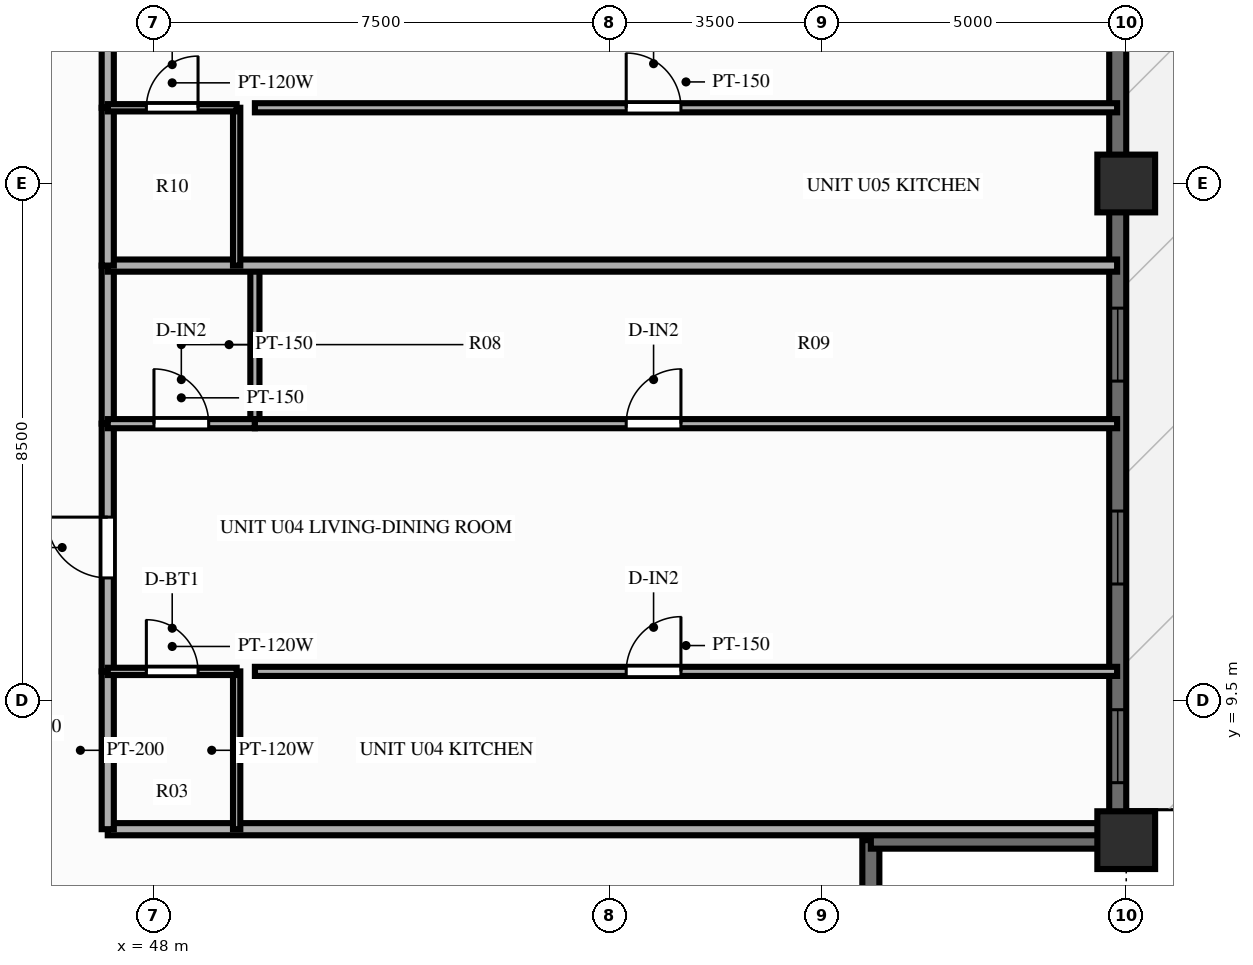
"""IFC4 building model, lengths in metres.
Left out: names, types, materials, properties, quantities, classifications, styles, units other than length and angle.
Written with IfcOpenShell. Run it as: python <this file> out.ifc"""

import sys

from ifc_helpers import new_model, si_unit, direction, frame, frame_2d, origin, origin_2d, place, context, subcontext, project, spatial, rectangle, extrude, source, transform, mapped, element, fill, save


model = new_model("IFC4")
c1 = context("Model", 3, precision=1e-05, world=origin(), true_north=direction((0.0, 1.0)))
c2 = subcontext(c1, "Body", "Model", "MODEL_VIEW")
j1 = project(units=[si_unit("LENGTHUNIT", "METRE"), si_unit("PLANEANGLEUNIT", "RADIAN")], contexts=[c1])
p1 = place(None, origin())
s1 = spatial("IfcSite", under=j1, at=p1, CompositionType="ELEMENT")
p2 = place(p1, origin())
s2 = spatial("IfcBuilding", under=s1, at=p2, CompositionType="ELEMENT")
p3 = place(p2, frame((0.0, 0.0, 95.85)))
s3 = spatial("IfcBuildingStorey", under=s2, at=p3, CompositionType="ELEMENT", Elevation=95.85)
m1 = source(origin(), c2, "Body", "SweptSolid", [
    extrude(rectangle(XDim=0.95, YDim=0.95, at=origin_2d()), origin(), (0.0, 0.0, 1.0), 3.0),
])
for number, where, z_axis, x_axis in (
    (1, (64.0, 7.2, 0.0), (0.0, 0.0, 1.0), (1.0, 0.0, 0.0)),
    (2, (64.0, 18.0, 0.0), (0.0, 0.0, 1.0), (1.0, 0.0, 0.0)),
):
    element("IfcColumn", number, at=place(p3, frame(where, z_axis=z_axis, x_axis=x_axis)), inside=s3, PredefinedType="COLUMN", context=c2, shape_type="MappedRepresentation", body=[
        mapped(m1, transform((0.0, 0.0, 0.0), scale=1.0)),
    ])
p4 = place(p3, frame((63.86, 7.2, 0.0), z_axis=(0.0, 0.0, 1.0), x_axis=(0.0, 1.0, 0.0)))
e3 = element("IfcWall", 3, at=p4, inside=s3, PredefinedType="SOLIDWALL", context=c2, shape_type="SweptSolid", body=[
    extrude(rectangle(XDim=39.6, YDim=0.28, at=frame_2d((19.8, 0.0))), origin(), (0.0, 0.0, 1.0), 2.28),
])
p5 = place(p4, frame((0.945, 0.0, 0.25)))
e4 = element("IfcOpeningElement", 4, at=p5, cuts=e3, PredefinedType="OPENING", context=c2, shape_type="SweptSolid", body=[
    extrude(rectangle(XDim=1.2, YDim=1.5, at=frame_2d((0.6, 0.75))), frame((0.0, 0.152, 0.0), z_axis=(0.0, -1.0, 0.0), x_axis=(1.0, 0.0, 0.0)), (0.0, 0.0, 1.0), 0.304),
])
p6 = place(p4, frame((4.213, 0.0, 0.25)))
e5 = element("IfcOpeningElement", 5, at=p6, cuts=e3, PredefinedType="OPENING", context=c2, shape_type="SweptSolid", body=[
    extrude(rectangle(XDim=1.2, YDim=1.5, at=frame_2d((0.6, 0.75))), frame((0.0, 0.152, 0.0), z_axis=(0.0, -1.0, 0.0), x_axis=(1.0, 0.0, 0.0)), (0.0, 0.0, 1.0), 0.304),
])
p7 = place(p4, frame((7.55, 0.0, 0.25)))
e6 = element("IfcOpeningElement", 6, at=p7, cuts=e3, PredefinedType="OPENING", context=c2, shape_type="SweptSolid", body=[
    extrude(rectangle(XDim=1.2, YDim=1.5, at=frame_2d((0.6, 0.75))), frame((0.0, 0.152, 0.0), z_axis=(0.0, -1.0, 0.0), x_axis=(1.0, 0.0, 0.0)), (0.0, 0.0, 1.0), 0.304),
])
p8 = place(p4, frame((13.483, 0.0, 0.25)))
e7 = element("IfcOpeningElement", 7, at=p8, cuts=e3, PredefinedType="OPENING", context=c2, shape_type="SweptSolid", body=[
    extrude(rectangle(XDim=1.2, YDim=1.5, at=frame_2d((0.6, 0.75))), frame((0.0, 0.152, 0.0), z_axis=(0.0, -1.0, 0.0), x_axis=(1.0, 0.0, 0.0)), (0.0, 0.0, 1.0), 0.304),
])
p9 = place(p4, frame((16.82, 0.0, 0.25)))
e8 = element("IfcOpeningElement", 8, at=p9, cuts=e3, PredefinedType="OPENING", context=c2, shape_type="SweptSolid", body=[
    extrude(rectangle(XDim=1.2, YDim=1.5, at=frame_2d((0.6, 0.75))), frame((0.0, 0.152, 0.0), z_axis=(0.0, -1.0, 0.0), x_axis=(1.0, 0.0, 0.0)), (0.0, 0.0, 1.0), 0.304),
])
p10 = place(p4, frame((19.2, 0.0, 0.25)))
e9 = element("IfcOpeningElement", 9, at=p10, cuts=e3, PredefinedType="OPENING", context=c2, shape_type="SweptSolid", body=[
    extrude(rectangle(XDim=1.2, YDim=1.5, at=frame_2d((0.6, 0.75))), frame((0.0, 0.152, 0.0), z_axis=(0.0, -1.0, 0.0), x_axis=(1.0, 0.0, 0.0)), (0.0, 0.0, 1.0), 0.304),
])
p11 = place(p4, frame((21.578, 0.0, 0.25)))
e10 = element("IfcOpeningElement", 10, at=p11, cuts=e3, PredefinedType="OPENING", context=c2, shape_type="SweptSolid", body=[
    extrude(rectangle(XDim=1.2, YDim=1.5, at=frame_2d((0.6, 0.75))), frame((0.0, 0.152, 0.0), z_axis=(0.0, -1.0, 0.0), x_axis=(1.0, 0.0, 0.0)), (0.0, 0.0, 1.0), 0.304),
])
p12 = place(p4, frame((26.313, 0.0, 0.0), z_axis=(0.0, 0.0, 1.0), x_axis=(-1.0, 0.0, 0.0)))
e11 = element("IfcOpeningElement", 11, at=p12, cuts=e3, PredefinedType="OPENING", context=c2, shape_type="SweptSolid", body=[
    extrude(rectangle(XDim=1.6, YDim=2.15, at=frame_2d((0.8, 1.075))), frame((0.0, 0.152, 0.0), z_axis=(0.0, -1.0, 0.0), x_axis=(1.0, 0.0, 0.0)), (0.0, 0.0, 1.0), 0.304),
])
p13 = place(p4, frame((29.305, 0.0, 0.25)))
e12 = element("IfcOpeningElement", 12, at=p13, cuts=e3, PredefinedType="OPENING", context=c2, shape_type="SweptSolid", body=[
    extrude(rectangle(XDim=0.7, YDim=1.5, at=frame_2d((0.35, 0.75))), frame((0.0, 0.152, 0.0), z_axis=(0.0, -1.0, 0.0), x_axis=(1.0, 0.0, 0.0)), (0.0, 0.0, 1.0), 0.304),
])
p14 = place(p4, frame((30.848, 0.0, 0.25)))
e13 = element("IfcOpeningElement", 13, at=p14, cuts=e3, PredefinedType="OPENING", context=c2, shape_type="SweptSolid", body=[
    extrude(rectangle(XDim=1.2, YDim=1.5, at=frame_2d((0.6, 0.75))), frame((0.0, 0.152, 0.0), z_axis=(0.0, -1.0, 0.0), x_axis=(1.0, 0.0, 0.0)), (0.0, 0.0, 1.0), 0.304),
])
p15 = place(p4, frame((34.183, 0.0, 0.25)))
e14 = element("IfcOpeningElement", 14, at=p15, cuts=e3, PredefinedType="OPENING", context=c2, shape_type="SweptSolid", body=[
    extrude(rectangle(XDim=1.2, YDim=1.5, at=frame_2d((0.6, 0.75))), frame((0.0, 0.152, 0.0), z_axis=(0.0, -1.0, 0.0), x_axis=(1.0, 0.0, 0.0)), (0.0, 0.0, 1.0), 0.304),
])
p16 = place(p4, frame((37.452, 0.0, 0.25)))
e15 = element("IfcOpeningElement", 15, at=p16, cuts=e3, PredefinedType="OPENING", context=c2, shape_type="SweptSolid", body=[
    extrude(rectangle(XDim=1.2, YDim=1.5, at=frame_2d((0.6, 0.75))), frame((0.0, 0.152, 0.0), z_axis=(0.0, -1.0, 0.0), x_axis=(1.0, 0.0, 0.0)), (0.0, 0.0, 1.0), 0.304),
])
for number, where, z_axis, x_axis in (
    (16, (59.8, 3.08, 0.0), (0.0, 0.0, 1.0), (0.0, 1.0, 0.0)),
    (17, (59.8, 7.2, 0.0), (0.0, 0.0, 1.0), (1.0, 0.0, 0.0)),
):
    element("IfcWall", number, at=place(p3, frame(where, z_axis=z_axis, x_axis=x_axis)), inside=s3, PredefinedType="SOLIDWALL", context=c2, shape_type="SweptSolid", body=[
        extrude(rectangle(XDim=4.12, YDim=0.28, at=frame_2d((2.06, 0.0))), origin(), (0.0, 0.0, 1.0), 2.28),
    ])
p17 = place(p3, frame((47.25, 7.38, 0.0), z_axis=(0.0, 0.0, 1.0), x_axis=(1.0, 0.0, 0.0)))
e18 = element("IfcWall", 18, at=p17, inside=s3, PredefinedType="PARTITIONING", context=c2, shape_type="SweptSolid", body=[
    extrude(rectangle(XDim=16.6, YDim=0.2, at=frame_2d((8.3, 0.0))), origin(), (0.0, 0.0, 1.0), 2.79),
])
p18 = place(p3, frame((47.25, 7.38, 0.0), z_axis=(0.0, 0.0, 1.0), x_axis=(0.0, 1.0, 0.0)))
e19 = element("IfcWall", 19, at=p18, inside=s3, PredefinedType="PARTITIONING", context=c2, shape_type="SweptSolid", body=[
    extrude(rectangle(XDim=2.596, YDim=0.2, at=frame_2d((1.298, 0.0))), origin(), (0.0, 0.0, 1.0), 2.79),
])
p19 = place(p3, frame((47.25, 9.976, 0.0), z_axis=(0.0, 0.0, 1.0), x_axis=(0.0, 1.0, 0.0)))
e20 = element("IfcWall", 20, at=p19, inside=s3, PredefinedType="PARTITIONING", context=c2, shape_type="SweptSolid", body=[
    extrude(rectangle(XDim=4.074, YDim=0.2, at=frame_2d((2.037, 0.0))), origin(), (0.0, 0.0, 1.0), 2.79),
])
p20 = place(p19, frame((1.537, 0.0, 0.0)))
e21 = element("IfcOpeningElement", 21, at=p20, cuts=e20, PredefinedType="OPENING", context=c2, shape_type="SweptSolid", body=[
    extrude(rectangle(XDim=1.0, YDim=2.15, at=frame_2d((0.5, 1.075))), frame((0.0, 0.112, 0.0), z_axis=(0.0, -1.0, 0.0), x_axis=(1.0, 0.0, 0.0)), (0.0, 0.0, 1.0), 0.224),
])
p21 = place(p3, frame((47.25, 14.05, 0.0), z_axis=(0.0, 0.0, 1.0), x_axis=(0.0, 1.0, 0.0)))
e22 = element("IfcWall", 22, at=p21, inside=s3, PredefinedType="PARTITIONING", context=c2, shape_type="SweptSolid", body=[
    extrude(rectangle(XDim=2.6, YDim=0.2, at=frame_2d((1.3, 0.0))), origin(), (0.0, 0.0, 1.0), 2.79),
])
p22 = place(p3, frame((49.37, 7.38, 0.0), z_axis=(0.0, 0.0, 1.0), x_axis=(0.0, 1.0, 0.0)))
e23 = element("IfcWall", 23, at=p22, inside=s3, PredefinedType="PARTITIONING", context=c2, shape_type="SweptSolid", body=[
    extrude(rectangle(XDim=2.596, YDim=0.12, at=frame_2d((1.298, 0.0))), origin(), (0.0, 0.0, 1.0), 2.79),
])
p23 = place(p3, frame((49.67, 14.05, 0.0), z_axis=(0.0, 0.0, 1.0), x_axis=(0.0, 1.0, 0.0)))
e24 = element("IfcWall", 24, at=p23, inside=s3, PredefinedType="PARTITIONING", context=c2, shape_type="SweptSolid", body=[
    extrude(rectangle(XDim=2.6, YDim=0.15, at=frame_2d((1.3, 0.0))), origin(), (0.0, 0.0, 1.0), 2.79),
])
p24 = place(p3, frame((47.25, 9.976, 0.0), z_axis=(0.0, 0.0, 1.0), x_axis=(1.0, 0.0, 0.0)))
e25 = element("IfcWall", 25, at=p24, inside=s3, PredefinedType="PARTITIONING", context=c2, shape_type="SweptSolid", body=[
    extrude(rectangle(XDim=2.12, YDim=0.12, at=frame_2d((1.06, 0.0))), origin(), (0.0, 0.0, 1.0), 2.79),
])
p25 = place(p24, frame((0.635, 0.0, 0.0)))
e26 = element("IfcOpeningElement", 26, at=p25, cuts=e25, PredefinedType="OPENING", context=c2, shape_type="SweptSolid", body=[
    extrude(rectangle(XDim=0.85, YDim=2.05, at=frame_2d((0.425, 1.025))), frame((0.0, 0.072, 0.0), z_axis=(0.0, -1.0, 0.0), x_axis=(1.0, 0.0, 0.0)), (0.0, 0.0, 1.0), 0.144),
])
p26 = place(p3, frame((49.67, 9.976, 0.0), z_axis=(0.0, 0.0, 1.0), x_axis=(1.0, 0.0, 0.0)))
e27 = element("IfcWall", 27, at=p26, inside=s3, PredefinedType="PARTITIONING", context=c2, shape_type="SweptSolid", body=[
    extrude(rectangle(XDim=14.18, YDim=0.15, at=frame_2d((7.09, 0.0))), origin(), (0.0, 0.0, 1.0), 2.79),
])
p27 = place(p26, frame((6.107, 0.0, 0.0)))
e28 = element("IfcOpeningElement", 28, at=p27, cuts=e27, PredefinedType="OPENING", context=c2, shape_type="SweptSolid", body=[
    extrude(rectangle(XDim=0.9, YDim=2.1, at=frame_2d((0.45, 1.05))), frame((0.0, 0.087, 0.0), z_axis=(0.0, -1.0, 0.0), x_axis=(1.0, 0.0, 0.0)), (0.0, 0.0, 1.0), 0.174),
])
p28 = place(p3, frame((47.25, 14.05, 0.0), z_axis=(0.0, 0.0, 1.0), x_axis=(1.0, 0.0, 0.0)))
e29 = element("IfcWall", 29, at=p28, inside=s3, PredefinedType="PARTITIONING", context=c2, shape_type="SweptSolid", body=[
    extrude(rectangle(XDim=2.42, YDim=0.15, at=frame_2d((1.21, 0.0))), origin(), (0.0, 0.0, 1.0), 2.79),
])
p29 = place(p28, frame((0.76, 0.0, 0.0)))
e30 = element("IfcOpeningElement", 30, at=p29, cuts=e29, PredefinedType="OPENING", context=c2, shape_type="SweptSolid", body=[
    extrude(rectangle(XDim=0.9, YDim=2.1, at=frame_2d((0.45, 1.05))), frame((0.0, 0.087, 0.0), z_axis=(0.0, -1.0, 0.0), x_axis=(1.0, 0.0, 0.0)), (0.0, 0.0, 1.0), 0.174),
])
p30 = place(p3, frame((49.67, 14.05, 0.0), z_axis=(0.0, 0.0, 1.0), x_axis=(1.0, 0.0, 0.0)))
e31 = element("IfcWall", 31, at=p30, inside=s3, PredefinedType="PARTITIONING", context=c2, shape_type="SweptSolid", body=[
    extrude(rectangle(XDim=14.18, YDim=0.15, at=frame_2d((7.09, 0.0))), origin(), (0.0, 0.0, 1.0), 2.79),
])
p31 = place(p30, frame((6.107, 0.0, 0.0)))
e32 = element("IfcOpeningElement", 32, at=p31, cuts=e31, PredefinedType="OPENING", context=c2, shape_type="SweptSolid", body=[
    extrude(rectangle(XDim=0.9, YDim=2.1, at=frame_2d((0.45, 1.05))), frame((0.0, 0.087, 0.0), z_axis=(0.0, -1.0, 0.0), x_axis=(1.0, 0.0, 0.0)), (0.0, 0.0, 1.0), 0.174),
])
p32 = place(p3, frame((47.25, 16.65, 0.0), z_axis=(0.0, 0.0, 1.0), x_axis=(1.0, 0.0, 0.0)))
e33 = element("IfcWall", 33, at=p32, inside=s3, PredefinedType="PARTITIONING", context=c2, shape_type="SweptSolid", body=[
    extrude(rectangle(XDim=16.6, YDim=0.2, at=frame_2d((8.3, 0.0))), origin(), (0.0, 0.0, 1.0), 2.79),
])
p33 = place(p3, frame((47.25, 16.65, 0.0), z_axis=(0.0, 0.0, 1.0), x_axis=(0.0, 1.0, 0.0)))
e34 = element("IfcWall", 34, at=p33, inside=s3, PredefinedType="PARTITIONING", context=c2, shape_type="SweptSolid", body=[
    extrude(rectangle(XDim=2.596, YDim=0.2, at=frame_2d((1.298, 0.0))), origin(), (0.0, 0.0, 1.0), 2.79),
])
p34 = place(p3, frame((47.25, 19.246, 0.0), z_axis=(0.0, 0.0, 1.0), x_axis=(0.0, 1.0, 0.0)))
e35 = element("IfcWall", 35, at=p34, inside=s3, PredefinedType="PARTITIONING", context=c2, shape_type="SweptSolid", body=[
    extrude(rectangle(XDim=4.074, YDim=0.2, at=frame_2d((2.037, 0.0))), origin(), (0.0, 0.0, 1.0), 2.79),
])
p35 = place(p34, frame((1.537, 0.0, 0.0)))
e36 = element("IfcOpeningElement", 36, at=p35, cuts=e35, PredefinedType="OPENING", context=c2, shape_type="SweptSolid", body=[
    extrude(rectangle(XDim=1.0, YDim=2.15, at=frame_2d((0.5, 1.075))), frame((0.0, 0.112, 0.0), z_axis=(0.0, -1.0, 0.0), x_axis=(1.0, 0.0, 0.0)), (0.0, 0.0, 1.0), 0.224),
])
p36 = place(p3, frame((49.37, 16.65, 0.0), z_axis=(0.0, 0.0, 1.0), x_axis=(0.0, 1.0, 0.0)))
e37 = element("IfcWall", 37, at=p36, inside=s3, PredefinedType="PARTITIONING", context=c2, shape_type="SweptSolid", body=[
    extrude(rectangle(XDim=2.596, YDim=0.12, at=frame_2d((1.298, 0.0))), origin(), (0.0, 0.0, 1.0), 2.79),
])
p37 = place(p3, frame((47.25, 19.246, 0.0), z_axis=(0.0, 0.0, 1.0), x_axis=(1.0, 0.0, 0.0)))
e38 = element("IfcWall", 38, at=p37, inside=s3, PredefinedType="PARTITIONING", context=c2, shape_type="SweptSolid", body=[
    extrude(rectangle(XDim=2.12, YDim=0.12, at=frame_2d((1.06, 0.0))), origin(), (0.0, 0.0, 1.0), 2.79),
])
p38 = place(p37, frame((0.635, 0.0, 0.0)))
e39 = element("IfcOpeningElement", 39, at=p38, cuts=e38, PredefinedType="OPENING", context=c2, shape_type="SweptSolid", body=[
    extrude(rectangle(XDim=0.85, YDim=2.05, at=frame_2d((0.425, 1.025))), frame((0.0, 0.072, 0.0), z_axis=(0.0, -1.0, 0.0), x_axis=(1.0, 0.0, 0.0)), (0.0, 0.0, 1.0), 0.144),
])
p39 = place(p3, frame((49.67, 19.246, 0.0), z_axis=(0.0, 0.0, 1.0), x_axis=(1.0, 0.0, 0.0)))
e40 = element("IfcWall", 40, at=p39, inside=s3, PredefinedType="PARTITIONING", context=c2, shape_type="SweptSolid", body=[
    extrude(rectangle(XDim=14.18, YDim=0.15, at=frame_2d((7.09, 0.0))), origin(), (0.0, 0.0, 1.0), 2.79),
])
p40 = place(p39, frame((6.107, 0.0, 0.0)))
e41 = element("IfcOpeningElement", 41, at=p40, cuts=e40, PredefinedType="OPENING", context=c2, shape_type="SweptSolid", body=[
    extrude(rectangle(XDim=0.9, YDim=2.1, at=frame_2d((0.45, 1.05))), frame((0.0, 0.087, 0.0), z_axis=(0.0, -1.0, 0.0), x_axis=(1.0, 0.0, 0.0)), (0.0, 0.0, 1.0), 0.174),
])
m2 = source(origin(), c2, "Body", "SweptSolid", [
    extrude(rectangle(XDim=1.2, YDim=1.5, at=frame_2d((0.6, 0.75))), frame((0.0, 0.03, 0.0), z_axis=(0.0, -1.0, 0.0), x_axis=(1.0, 0.0, 0.0)), (0.0, 0.0, 1.0), 0.06),
])
p41 = place(p5, origin())
e42 = element("IfcWindow", 42, at=p41, inside=s3, PartitioningType="SINGLE_PANEL", PredefinedType="WINDOW", context=c2, shape_type="MappedRepresentation", body=[
    mapped(m2, transform((0.0, 0.0, 0.0), scale=1.0)),
])
fill(e4, e42)
p42 = place(p6, origin())
e43 = element("IfcWindow", 43, at=p42, inside=s3, PartitioningType="SINGLE_PANEL", PredefinedType="WINDOW", context=c2, shape_type="MappedRepresentation", body=[
    mapped(m2, transform((0.0, 0.0, 0.0), scale=1.0)),
])
fill(e5, e43)
p43 = place(p7, origin())
e44 = element("IfcWindow", 44, at=p43, inside=s3, PartitioningType="SINGLE_PANEL", PredefinedType="WINDOW", context=c2, shape_type="MappedRepresentation", body=[
    mapped(m2, transform((0.0, 0.0, 0.0), scale=1.0)),
])
fill(e6, e44)
m3 = source(origin(), c2, "Body", "SweptSolid", [
    extrude(rectangle(XDim=1.0, YDim=2.15, at=frame_2d((0.5, 1.075))), frame((0.0, 0.025, 0.0), z_axis=(0.0, -1.0, 0.0), x_axis=(1.0, 0.0, 0.0)), (0.0, 0.0, 1.0), 0.05),
])
p44 = place(p20, origin())
e45 = element("IfcDoor", 45, at=p44, inside=s3, OperationType="SINGLE_SWING_RIGHT", PredefinedType="DOOR", context=c2, shape_type="MappedRepresentation", body=[
    mapped(m3, transform((0.0, 0.0, 0.0), scale=1.0)),
])
fill(e21, e45)
m4 = source(origin(), c2, "Body", "SweptSolid", [
    extrude(rectangle(XDim=0.85, YDim=2.05, at=frame_2d((0.425, 1.025))), frame((0.0, 0.025, 0.0), z_axis=(0.0, -1.0, 0.0), x_axis=(1.0, 0.0, 0.0)), (0.0, 0.0, 1.0), 0.05),
])
p45 = place(p25, origin())
e46 = element("IfcDoor", 46, at=p45, inside=s3, OperationType="SINGLE_SWING_LEFT", PredefinedType="DOOR", context=c2, shape_type="MappedRepresentation", body=[
    mapped(m4, transform((0.0, 0.0, 0.0), scale=1.0)),
])
fill(e26, e46)
m5 = source(origin(), c2, "Body", "SweptSolid", [
    extrude(rectangle(XDim=0.9, YDim=2.1, at=frame_2d((0.45, 1.05))), frame((0.0, 0.025, 0.0), z_axis=(0.0, -1.0, 0.0), x_axis=(1.0, 0.0, 0.0)), (0.0, 0.0, 1.0), 0.05),
])
p46 = place(p27, origin())
e47 = element("IfcDoor", 47, at=p46, inside=s3, OperationType="SINGLE_SWING_RIGHT", PredefinedType="DOOR", context=c2, shape_type="MappedRepresentation", body=[
    mapped(m5, transform((0.0, 0.0, 0.0), scale=1.0)),
])
fill(e28, e47)
p47 = place(p29, origin())
e48 = element("IfcDoor", 48, at=p47, inside=s3, OperationType="SINGLE_SWING_LEFT", PredefinedType="DOOR", context=c2, shape_type="MappedRepresentation", body=[
    mapped(m5, transform((0.0, 0.0, 0.0), scale=1.0)),
])
fill(e30, e48)
p48 = place(p31, origin())
e49 = element("IfcDoor", 49, at=p48, inside=s3, OperationType="SINGLE_SWING_RIGHT", PredefinedType="DOOR", context=c2, shape_type="MappedRepresentation", body=[
    mapped(m5, transform((0.0, 0.0, 0.0), scale=1.0)),
])
fill(e32, e49)
p49 = place(p38, origin())
e50 = element("IfcDoor", 50, at=p49, inside=s3, OperationType="SINGLE_SWING_RIGHT", PredefinedType="DOOR", context=c2, shape_type="MappedRepresentation", body=[
    mapped(m4, transform((0.0, 0.0, 0.0), scale=1.0)),
])
fill(e39, e50)
p50 = place(p40, origin())
e51 = element("IfcDoor", 51, at=p50, inside=s3, OperationType="SINGLE_SWING_LEFT", PredefinedType="DOOR", context=c2, shape_type="MappedRepresentation", body=[
    mapped(m5, transform((0.0, 0.0, 0.0), scale=1.0)),
])
fill(e41, e51)
save(model, sys.argv[1])
